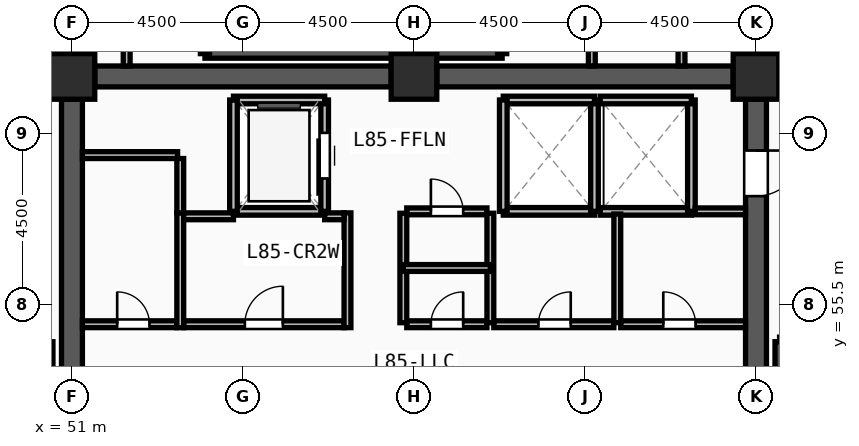
"""IFC4 building model, lengths in metres.
Left out: names, types, materials, properties, quantities, classifications, styles, units other than length and angle.
Written with IfcOpenShell. Run it as: python <this file> out.ifc"""

import sys

from ifc_helpers import new_model, si_unit, direction, frame, frame_2d, origin, origin_2d, place, context, subcontext, project, spatial, rectangle, extrude, source, transform, mapped, element, fill, save


model = new_model("IFC4")
c1 = context("Model", 3, precision=1e-05, world=origin(), true_north=direction((0.0, 1.0)))
c2 = subcontext(c1, "Body", "Model", "MODEL_VIEW")
j1 = project(units=[si_unit("LENGTHUNIT", "METRE"), si_unit("PLANEANGLEUNIT", "RADIAN")], contexts=[c1])
p1 = place(None, origin())
s1 = spatial("IfcSite", under=j1, at=p1, CompositionType="ELEMENT")
p2 = place(p1, origin())
s2 = spatial("IfcBuilding", under=s1, at=p2, CompositionType="ELEMENT")
p3 = place(p2, frame((0.0, 0.0, 328.5)))
s3 = spatial("IfcBuildingStorey", under=s2, at=p3, CompositionType="ELEMENT", Elevation=328.5)
m1 = source(origin(), c2, "Body", "SweptSolid", [
    extrude(rectangle(XDim=1.2, YDim=1.2, at=origin_2d()), origin(), (0.0, 0.0, 1.0), 3.75),
])
for number, where, z_axis, x_axis in (
    (1, (69.0, 61.5, 0.0), (0.0, 0.0, 1.0), (1.0, 0.0, 0.0)),
    (2, (60.0, 61.5, 0.0), (0.0, 0.0, 1.0), (1.0, 0.0, 0.0)),
    (3, (51.0, 61.5, 0.0), (0.0, 0.0, 1.0), (1.0, 0.0, 0.0)),
):
    element("IfcColumn", number, at=place(p3, frame(where, z_axis=z_axis, x_axis=x_axis)), inside=s3, PredefinedType="COLUMN", context=c2, shape_type="MappedRepresentation", body=[
        mapped(m1, transform((0.0, 0.0, 0.0), x_axis=(1.0, 0.0, 0.0), y_axis=(0.0, 1.0, 0.0), z_axis=(0.0, 0.0, 1.0), scale=1.0)),
    ])
for number, where, z_axis, x_axis in (
    (4, (51.6, 61.5, 0.0), (0.0, 0.0, 1.0), (1.0, 0.0, 0.0)),
    (5, (60.6, 61.5, 0.0), (0.0, 0.0, 1.0), (1.0, 0.0, 0.0)),
):
    element("IfcWall", number, at=place(p3, frame(where, z_axis=z_axis, x_axis=x_axis)), inside=s3, PredefinedType="SHEAR", context=c2, shape_type="SweptSolid", body=[
        extrude(rectangle(XDim=7.8, YDim=0.55, at=frame_2d((3.9, 0.0))), origin(), (0.0, 0.0, 1.0), 3.57),
    ])
p4 = place(p3, frame((69.0, 60.9, 0.0), z_axis=(0.0, 0.0, 1.0), x_axis=(0.0, -1.0, 0.0)))
e6 = element("IfcWall", 6, at=p4, inside=s3, PredefinedType="SHEAR", context=c2, shape_type="SweptSolid", body=[
    extrude(rectangle(XDim=13.8, YDim=0.55, at=frame_2d((6.9, 0.0))), origin(), (0.0, 0.0, 1.0), 3.57),
])
m2 = source(origin(), c2, "Body", "SweptSolid", [
    extrude(rectangle(XDim=1.2, YDim=2.2, at=frame_2d((0.6, 1.1))), frame((0.0, 0.285, 0.0), z_axis=(0.0, -1.0, 0.0), x_axis=(1.0, 0.0, 0.0)), (0.0, 0.0, 1.0), 0.57),
])
p5 = place(p4, frame((1.35, 0.0, 0.0)))
e7 = element("IfcOpeningElement", 7, at=p5, cuts=e6, PredefinedType="OPENING", context=c2, shape_type="MappedRepresentation", body=[
    mapped(m2, transform((0.0, 0.0, 0.0), x_axis=(1.0, 0.0, 0.0), y_axis=(0.0, 1.0, 0.0), z_axis=(0.0, 0.0, 1.0), scale=1.0)),
])
p6 = place(p3, frame((51.0, 47.1, 0.0), z_axis=(0.0, 0.0, 1.0), x_axis=(0.0, 1.0, 0.0)))
e8 = element("IfcWall", 8, at=p6, inside=s3, PredefinedType="SHEAR", context=c2, shape_type="SweptSolid", body=[
    extrude(rectangle(XDim=13.8, YDim=0.55, at=frame_2d((6.9, 0.0))), origin(), (0.0, 0.0, 1.0), 3.57),
])
for number, where, z_axis, x_axis in (
    (9, (50.38, 46.7, 0.0), (0.0, 0.0, 1.0), (0.0, 1.0, 0.0)),
    (10, (69.62, 54.52, 0.0), (0.0, 0.0, 1.0), (0.0, -1.0, 0.0)),
    (11, (54.5, 62.1, 0.0), (0.0, 0.0, 1.0), (1.0, 0.0, 0.0)),
):
    element("IfcWall", number, at=place(p3, frame(where, z_axis=z_axis, x_axis=x_axis)), inside=s3, PredefinedType="SOLIDWALL", context=c2, shape_type="SweptSolid", body=[
        extrude(rectangle(XDim=7.82, YDim=0.24, at=frame_2d((3.91, 0.0))), origin(), (0.0, 0.0, 1.0), 3.57),
    ])
for number, where, z_axis, x_axis in (
    (12, (62.32, 62.1, 0.0), (0.0, 0.0, 1.0), (0.0, 1.0, 0.0)),
    (13, (54.5, 65.54, 0.0), (0.0, 0.0, 1.0), (0.0, -1.0, 0.0)),
):
    element("IfcWall", number, at=place(p3, frame(where, z_axis=z_axis, x_axis=x_axis)), inside=s3, PredefinedType="SOLIDWALL", context=c2, shape_type="SweptSolid", body=[
        extrude(rectangle(XDim=3.44, YDim=0.24, at=frame_2d((1.72, 0.0))), origin(), (0.0, 0.0, 1.0), 3.57),
    ])
p7 = place(p3, frame((55.25, 57.95, 0.0), z_axis=(0.0, 0.0, 1.0), x_axis=(1.0, 0.0, 0.0)))
e14 = element("IfcWall", 14, at=p7, inside=s3, PredefinedType="SOLIDWALL", context=c2, shape_type="SweptSolid", body=[
    extrude(rectangle(XDim=2.4, YDim=0.2, at=frame_2d((1.2, 0.0))), origin(), (0.0, 0.0, 1.0), 3.57),
])
p8 = place(p3, frame((57.65, 57.95, 0.0), z_axis=(0.0, 0.0, 1.0), x_axis=(0.0, 1.0, 0.0)))
e15 = element("IfcWall", 15, at=p8, inside=s3, PredefinedType="SOLIDWALL", context=c2, shape_type="SweptSolid", body=[
    extrude(rectangle(XDim=2.93, YDim=0.2, at=frame_2d((1.465, 0.0))), origin(), (0.0, 0.0, 1.0), 3.57),
])
m3 = source(origin(), c2, "Body", "SweptSolid", [
    extrude(rectangle(XDim=1.2, YDim=2.3, at=frame_2d((0.6, 1.15))), frame((0.0, 0.11, 0.0), z_axis=(0.0, -1.0, 0.0), x_axis=(1.0, 0.0, 0.0)), (0.0, 0.0, 1.0), 0.22),
])
p9 = place(p8, frame((0.865, 0.0, 0.0)))
e16 = element("IfcOpeningElement", 16, at=p9, cuts=e15, PredefinedType="OPENING", context=c2, shape_type="MappedRepresentation", body=[
    mapped(m3, transform((0.0, 0.0, 0.0), x_axis=(1.0, 0.0, 0.0), y_axis=(0.0, 1.0, 0.0), z_axis=(0.0, 0.0, 1.0), scale=1.0)),
])
p10 = place(p3, frame((57.65, 60.88, 0.0), z_axis=(0.0, 0.0, 1.0), x_axis=(-1.0, 0.0, 0.0)))
e17 = element("IfcWall", 17, at=p10, inside=s3, PredefinedType="SOLIDWALL", context=c2, shape_type="SweptSolid", body=[
    extrude(rectangle(XDim=2.4, YDim=0.2, at=frame_2d((1.2, 0.0))), origin(), (0.0, 0.0, 1.0), 3.57),
])
p11 = place(p3, frame((55.25, 60.88, 0.0), z_axis=(0.0, 0.0, 1.0), x_axis=(0.0, -1.0, 0.0)))
e18 = element("IfcWall", 18, at=p11, inside=s3, PredefinedType="SOLIDWALL", context=c2, shape_type="SweptSolid", body=[
    extrude(rectangle(XDim=2.93, YDim=0.2, at=frame_2d((1.465, 0.0))), origin(), (0.0, 0.0, 1.0), 3.57),
])
p12 = place(p3, frame((62.35, 57.95, 0.0), z_axis=(0.0, 0.0, 1.0), x_axis=(1.0, 0.0, 0.0)))
e19 = element("IfcWall", 19, at=p12, inside=s3, PredefinedType="SOLIDWALL", context=c2, shape_type="SweptSolid", body=[
    extrude(rectangle(XDim=2.4, YDim=0.2, at=frame_2d((1.2, 0.0))), origin(), (0.0, 0.0, 1.0), 3.57),
])
p13 = place(p3, frame((64.75, 57.95, 0.0), z_axis=(0.0, 0.0, 1.0), x_axis=(0.0, 1.0, 0.0)))
e20 = element("IfcWall", 20, at=p13, inside=s3, PredefinedType="SOLIDWALL", context=c2, shape_type="SweptSolid", body=[
    extrude(rectangle(XDim=2.93, YDim=0.2, at=frame_2d((1.465, 0.0))), origin(), (0.0, 0.0, 1.0), 3.57),
])
p14 = place(p3, frame((64.75, 60.88, 0.0), z_axis=(0.0, 0.0, 1.0), x_axis=(-1.0, 0.0, 0.0)))
e21 = element("IfcWall", 21, at=p14, inside=s3, PredefinedType="SOLIDWALL", context=c2, shape_type="SweptSolid", body=[
    extrude(rectangle(XDim=2.4, YDim=0.2, at=frame_2d((1.2, 0.0))), origin(), (0.0, 0.0, 1.0), 3.57),
])
p15 = place(p3, frame((62.35, 60.88, 0.0), z_axis=(0.0, 0.0, 1.0), x_axis=(0.0, -1.0, 0.0)))
e22 = element("IfcWall", 22, at=p15, inside=s3, PredefinedType="SOLIDWALL", context=c2, shape_type="SweptSolid", body=[
    extrude(rectangle(XDim=2.93, YDim=0.2, at=frame_2d((1.465, 0.0))), origin(), (0.0, 0.0, 1.0), 3.57),
])
p16 = place(p3, frame((64.9, 57.95, 0.0), z_axis=(0.0, 0.0, 1.0), x_axis=(1.0, 0.0, 0.0)))
e23 = element("IfcWall", 23, at=p16, inside=s3, PredefinedType="SOLIDWALL", context=c2, shape_type="SweptSolid", body=[
    extrude(rectangle(XDim=2.4, YDim=0.2, at=frame_2d((1.2, 0.0))), origin(), (0.0, 0.0, 1.0), 3.57),
])
p17 = place(p3, frame((67.3, 57.95, 0.0), z_axis=(0.0, 0.0, 1.0), x_axis=(0.0, 1.0, 0.0)))
e24 = element("IfcWall", 24, at=p17, inside=s3, PredefinedType="SOLIDWALL", context=c2, shape_type="SweptSolid", body=[
    extrude(rectangle(XDim=2.93, YDim=0.2, at=frame_2d((1.465, 0.0))), origin(), (0.0, 0.0, 1.0), 3.57),
])
p18 = place(p3, frame((67.3, 60.88, 0.0), z_axis=(0.0, 0.0, 1.0), x_axis=(-1.0, 0.0, 0.0)))
e25 = element("IfcWall", 25, at=p18, inside=s3, PredefinedType="SOLIDWALL", context=c2, shape_type="SweptSolid", body=[
    extrude(rectangle(XDim=2.4, YDim=0.2, at=frame_2d((1.2, 0.0))), origin(), (0.0, 0.0, 1.0), 3.57),
])
p19 = place(p3, frame((53.94, 54.98, 0.0), z_axis=(0.0, 0.0, 1.0), x_axis=(1.0, 0.0, 0.0)))
e26 = element("IfcWall", 26, at=p19, inside=s3, PredefinedType="PARTITIONING", context=c2, shape_type="SweptSolid", body=[
    extrude(rectangle(XDim=4.22, YDim=0.18, at=frame_2d((2.11, 0.0))), origin(), (0.0, 0.0, 1.0), 3.57),
])
m4 = source(origin(), c2, "Body", "SweptSolid", [
    extrude(rectangle(XDim=1.0, YDim=2.2, at=frame_2d((0.5, 1.1))), frame((0.0, 0.1, 0.0), z_axis=(0.0, -1.0, 0.0), x_axis=(1.0, 0.0, 0.0)), (0.0, 0.0, 1.0), 0.2),
])
p20 = place(p19, frame((1.61, 0.0, 0.0)))
e27 = element("IfcOpeningElement", 27, at=p20, cuts=e26, PredefinedType="OPENING", context=c2, shape_type="MappedRepresentation", body=[
    mapped(m4, transform((0.0, 0.0, 0.0), x_axis=(1.0, 0.0, 0.0), y_axis=(0.0, 1.0, 0.0), z_axis=(0.0, 0.0, 1.0), scale=1.0)),
])
p21 = place(p3, frame((51.275, 54.98, 0.0), z_axis=(0.0, 0.0, 1.0), x_axis=(1.0, 0.0, 0.0)))
e28 = element("IfcWall", 28, at=p21, inside=s3, PredefinedType="PARTITIONING", context=c2, shape_type="SweptSolid", body=[
    extrude(rectangle(XDim=2.485, YDim=0.18, at=frame_2d((1.243, 0.0))), origin(), (0.0, 0.0, 1.0), 3.57),
])
m5 = source(origin(), c2, "Body", "SweptSolid", [
    extrude(rectangle(XDim=0.85, YDim=2.1, at=frame_2d((0.425, 1.05))), frame((0.0, 0.1, 0.0), z_axis=(0.0, -1.0, 0.0), x_axis=(1.0, 0.0, 0.0)), (0.0, 0.0, 1.0), 0.2),
])
p22 = place(p21, frame((0.915, 0.0, 0.0)))
e29 = element("IfcOpeningElement", 29, at=p22, cuts=e28, PredefinedType="OPENING", context=c2, shape_type="MappedRepresentation", body=[
    mapped(m5, transform((0.0, 0.0, 0.0), x_axis=(1.0, 0.0, 0.0), y_axis=(0.0, 1.0, 0.0), z_axis=(0.0, 0.0, 1.0), scale=1.0)),
])
p23 = place(p3, frame((62.1, 54.98, 0.0), z_axis=(0.0, 0.0, 1.0), x_axis=(1.0, 0.0, 0.0)))
e30 = element("IfcWall", 30, at=p23, inside=s3, PredefinedType="PARTITIONING", context=c2, shape_type="SweptSolid", body=[
    extrude(rectangle(XDim=3.16, YDim=0.18, at=frame_2d((1.58, 0.0))), origin(), (0.0, 0.0, 1.0), 3.57),
])
p24 = place(p23, frame((1.175, 0.0, 0.0)))
e31 = element("IfcOpeningElement", 31, at=p24, cuts=e30, PredefinedType="OPENING", context=c2, shape_type="MappedRepresentation", body=[
    mapped(m5, transform((0.0, 0.0, 0.0), x_axis=(1.0, 0.0, 0.0), y_axis=(0.0, 1.0, 0.0), z_axis=(0.0, 0.0, 1.0), scale=1.0)),
])
p25 = place(p3, frame((65.44, 54.98, 0.0), z_axis=(0.0, 0.0, 1.0), x_axis=(1.0, 0.0, 0.0)))
e32 = element("IfcWall", 32, at=p25, inside=s3, PredefinedType="PARTITIONING", context=c2, shape_type="SweptSolid", body=[
    extrude(rectangle(XDim=3.285, YDim=0.18, at=frame_2d((1.643, 0.0))), origin(), (0.0, 0.0, 1.0), 3.57),
])
p26 = place(p25, frame((1.12, 0.0, 0.0)))
e33 = element("IfcOpeningElement", 33, at=p26, cuts=e32, PredefinedType="OPENING", context=c2, shape_type="MappedRepresentation", body=[
    mapped(m5, transform((0.0, 0.0, 0.0), x_axis=(1.0, 0.0, 0.0), y_axis=(0.0, 1.0, 0.0), z_axis=(0.0, 0.0, 1.0), scale=1.0)),
])
p27 = place(p3, frame((59.81, 54.98, 0.0), z_axis=(0.0, 0.0, 1.0), x_axis=(1.0, 0.0, 0.0)))
e34 = element("IfcWall", 34, at=p27, inside=s3, PredefinedType="PARTITIONING", context=c2, shape_type="SweptSolid", body=[
    extrude(rectangle(XDim=2.11, YDim=0.18, at=frame_2d((1.055, 0.0))), origin(), (0.0, 0.0, 1.0), 3.57),
])
p28 = place(p27, frame((0.635, 0.0, 0.0)))
e35 = element("IfcOpeningElement", 35, at=p28, cuts=e34, PredefinedType="OPENING", context=c2, shape_type="MappedRepresentation", body=[
    mapped(m5, transform((0.0, 0.0, 0.0), x_axis=(1.0, 0.0, 0.0), y_axis=(0.0, 1.0, 0.0), z_axis=(0.0, 0.0, 1.0), scale=1.0)),
])
p29 = place(p3, frame((59.81, 57.95, 0.0), z_axis=(0.0, 0.0, 1.0), x_axis=(1.0, 0.0, 0.0)))
e36 = element("IfcWall", 36, at=p29, inside=s3, PredefinedType="PARTITIONING", context=c2, shape_type="SweptSolid", body=[
    extrude(rectangle(XDim=2.11, YDim=0.18, at=frame_2d((1.055, 0.0))), origin(), (0.0, 0.0, 1.0), 3.57),
])
p30 = place(p29, frame((0.635, 0.0, 0.0)))
e37 = element("IfcOpeningElement", 37, at=p30, cuts=e36, PredefinedType="OPENING", context=c2, shape_type="MappedRepresentation", body=[
    mapped(m5, transform((0.0, 0.0, 0.0), x_axis=(1.0, 0.0, 0.0), y_axis=(0.0, 1.0, 0.0), z_axis=(0.0, 0.0, 1.0), scale=1.0)),
])
p31 = place(p3, frame((51.275, 59.43, 0.0), z_axis=(0.0, 0.0, 1.0), x_axis=(1.0, 0.0, 0.0)))
e38 = element("IfcWall", 38, at=p31, inside=s3, PredefinedType="PARTITIONING", context=c2, shape_type="SweptSolid", body=[
    extrude(rectangle(XDim=2.505, YDim=0.18, at=frame_2d((1.252, 0.0))), origin(), (0.0, 0.0, 1.0), 3.57),
])
p32 = place(p3, frame((65.35, 55.02, 0.0), z_axis=(0.0, 0.0, 1.0), x_axis=(0.0, 1.0, 0.0)))
e39 = element("IfcWall", 39, at=p32, inside=s3, PredefinedType="PARTITIONING", context=c2, shape_type="SweptSolid", body=[
    extrude(rectangle(XDim=2.86, YDim=0.18, at=frame_2d((1.43, 0.0))), origin(), (0.0, 0.0, 1.0), 3.57),
])
for number, where, z_axis, x_axis in (
    (40, (59.72, 55.02, 0.0), (0.0, 0.0, 1.0), (0.0, 1.0, 0.0)),
    (41, (62.01, 55.02, 0.0), (0.0, 0.0, 1.0), (0.0, 1.0, 0.0)),
):
    element("IfcWall", number, at=place(p3, frame(where, z_axis=z_axis, x_axis=x_axis)), inside=s3, PredefinedType="PARTITIONING", context=c2, shape_type="SweptSolid", body=[
        extrude(rectangle(XDim=2.88, YDim=0.18, at=frame_2d((1.44, 0.0))), origin(), (0.0, 0.0, 1.0), 3.57),
    ])
p33 = place(p3, frame((59.72, 56.46, 0.0), z_axis=(0.0, 0.0, 1.0), x_axis=(1.0, 0.0, 0.0)))
e42 = element("IfcWall", 42, at=p33, inside=s3, PredefinedType="PARTITIONING", context=c2, shape_type="SweptSolid", body=[
    extrude(rectangle(XDim=2.29, YDim=0.18, at=frame_2d((1.145, 0.0))), origin(), (0.0, 0.0, 1.0), 3.57),
])
p34 = place(p3, frame((50.54, 61.95, 0.0), z_axis=(0.0, 0.0, 1.0), x_axis=(0.0, 1.0, 0.0)))
e43 = element("IfcWall", 43, at=p34, inside=s3, PredefinedType="PARTITIONING", context=c2, shape_type="SweptSolid", body=[
    extrude(rectangle(XDim=3.63, YDim=0.18, at=frame_2d((1.815, 0.0))), origin(), (0.0, 0.0, 1.0), 3.57),
])
for number, where, z_axis, x_axis in (
    (44, (52.44, 61.775, 0.0), (0.0, 0.0, 1.0), (0.0, 1.0, 0.0)),
    (45, (64.68, 61.775, 0.0), (0.0, 0.0, 1.0), (0.0, 1.0, 0.0)),
    (46, (67.04, 61.775, 0.0), (0.0, 0.0, 1.0), (0.0, 1.0, 0.0)),
):
    element("IfcWall", number, at=place(p3, frame(where, z_axis=z_axis, x_axis=x_axis)), inside=s3, PredefinedType="PARTITIONING", context=c2, shape_type="SweptSolid", body=[
        extrude(rectangle(XDim=3.805, YDim=0.18, at=frame_2d((1.903, 0.0))), origin(), (0.0, 0.0, 1.0), 3.57),
    ])
p35 = place(p3, frame((69.46, 61.95, 0.0), z_axis=(0.0, 0.0, 1.0), x_axis=(0.0, 1.0, 0.0)))
e47 = element("IfcWall", 47, at=p35, inside=s3, PredefinedType="PARTITIONING", context=c2, shape_type="SweptSolid", body=[
    extrude(rectangle(XDim=3.63, YDim=0.18, at=frame_2d((1.815, 0.0))), origin(), (0.0, 0.0, 1.0), 3.57),
])
for number, where, z_axis, x_axis in (
    (48, (53.85, 54.89, 0.0), (0.0, 0.0, 1.0), (0.0, 1.0, 0.0)),
    (49, (58.25, 54.89, 0.0), (0.0, 0.0, 1.0), (0.0, 1.0, 0.0)),
):
    element("IfcWall", number, at=place(p3, frame(where, z_axis=z_axis, x_axis=x_axis)), inside=s3, PredefinedType="PARTITIONING", context=c2, shape_type="SweptSolid", body=[
        extrude(rectangle(XDim=3.02, YDim=0.18, at=frame_2d((1.51, 0.0))), origin(), (0.0, 0.0, 1.0), 3.57),
    ])
p36 = place(p3, frame((53.94, 57.82, 0.0), z_axis=(0.0, 0.0, 1.0), x_axis=(1.0, 0.0, 0.0)))
e50 = element("IfcWall", 50, at=p36, inside=s3, PredefinedType="PARTITIONING", context=c2, shape_type="SweptSolid", body=[
    extrude(rectangle(XDim=1.31, YDim=0.18, at=frame_2d((0.655, 0.0))), origin(), (0.0, 0.0, 1.0), 3.57),
])
p37 = place(p3, frame((57.65, 57.82, 0.0), z_axis=(0.0, 0.0, 1.0), x_axis=(1.0, 0.0, 0.0)))
e51 = element("IfcWall", 51, at=p37, inside=s3, PredefinedType="PARTITIONING", context=c2, shape_type="SweptSolid", body=[
    extrude(rectangle(XDim=0.51, YDim=0.18, at=frame_2d((0.255, 0.0))), origin(), (0.0, 0.0, 1.0), 3.57),
])
p38 = place(p3, frame((53.85, 57.91, 0.0), z_axis=(0.0, 0.0, 1.0), x_axis=(0.0, 1.0, 0.0)))
e52 = element("IfcWall", 52, at=p38, inside=s3, PredefinedType="PARTITIONING", context=c2, shape_type="SweptSolid", body=[
    extrude(rectangle(XDim=1.43, YDim=0.18, at=frame_2d((0.715, 0.0))), origin(), (0.0, 0.0, 1.0), 3.57),
])
p39 = place(p3, frame((67.4, 57.95, 0.0), z_axis=(0.0, 0.0, 1.0), x_axis=(1.0, 0.0, 0.0)))
e53 = element("IfcWall", 53, at=p39, inside=s3, PredefinedType="PARTITIONING", context=c2, shape_type="SweptSolid", body=[
    extrude(rectangle(XDim=1.325, YDim=0.18, at=frame_2d((0.663, 0.0))), origin(), (0.0, 0.0, 1.0), 3.57),
])
m6 = source(origin(), c2, "Body", "SweptSolid", [
    extrude(rectangle(XDim=1.2, YDim=2.2, at=frame_2d((0.6, 1.1))), frame((0.0, 0.025, 0.0), z_axis=(0.0, -1.0, 0.0), x_axis=(1.0, 0.0, 0.0)), (0.0, 0.0, 1.0), 0.05),
])
p40 = place(p5, origin())
e54 = element("IfcDoor", 54, at=p40, inside=s3, OperationType="SINGLE_SWING_LEFT", PredefinedType="DOOR", context=c2, shape_type="MappedRepresentation", body=[
    mapped(m6, transform((0.0, 0.0, 0.0), x_axis=(1.0, 0.0, 0.0), y_axis=(0.0, 1.0, 0.0), z_axis=(0.0, 0.0, 1.0), scale=1.0)),
])
fill(e7, e54)
m7 = source(origin(), c2, "Body", "SweptSolid", [
    extrude(rectangle(XDim=1.2, YDim=2.3, at=frame_2d((0.6, 1.15))), frame((0.0, 0.025, 0.0), z_axis=(0.0, -1.0, 0.0), x_axis=(1.0, 0.0, 0.0)), (0.0, 0.0, 1.0), 0.05),
])
p41 = place(p9, origin())
e55 = element("IfcDoor", 55, at=p41, inside=s3, OperationType="SLIDING_TO_LEFT", PredefinedType="DOOR", context=c2, shape_type="MappedRepresentation", body=[
    mapped(m7, transform((0.0, 0.0, 0.0), x_axis=(1.0, 0.0, 0.0), y_axis=(0.0, 1.0, 0.0), z_axis=(0.0, 0.0, 1.0), scale=1.0)),
])
fill(e16, e55)
m8 = source(origin(), c2, "Body", "SweptSolid", [
    extrude(rectangle(XDim=1.0, YDim=2.2, at=frame_2d((0.5, 1.1))), frame((0.0, 0.025, 0.0), z_axis=(0.0, -1.0, 0.0), x_axis=(1.0, 0.0, 0.0)), (0.0, 0.0, 1.0), 0.05),
])
p42 = place(p20, origin())
e56 = element("IfcDoor", 56, at=p42, inside=s3, OperationType="SINGLE_SWING_RIGHT", PredefinedType="DOOR", context=c2, shape_type="MappedRepresentation", body=[
    mapped(m8, transform((0.0, 0.0, 0.0), x_axis=(1.0, 0.0, 0.0), y_axis=(0.0, 1.0, 0.0), z_axis=(0.0, 0.0, 1.0), scale=1.0)),
])
fill(e27, e56)
m9 = source(origin(), c2, "Body", "SweptSolid", [
    extrude(rectangle(XDim=0.85, YDim=2.1, at=frame_2d((0.425, 1.05))), frame((0.0, 0.025, 0.0), z_axis=(0.0, -1.0, 0.0), x_axis=(1.0, 0.0, 0.0)), (0.0, 0.0, 1.0), 0.05),
])
p43 = place(p22, origin())
e57 = element("IfcDoor", 57, at=p43, inside=s3, OperationType="SINGLE_SWING_LEFT", PredefinedType="DOOR", context=c2, shape_type="MappedRepresentation", body=[
    mapped(m9, transform((0.0, 0.0, 0.0), x_axis=(1.0, 0.0, 0.0), y_axis=(0.0, 1.0, 0.0), z_axis=(0.0, 0.0, 1.0), scale=1.0)),
])
fill(e29, e57)
p44 = place(p24, origin())
e58 = element("IfcDoor", 58, at=p44, inside=s3, OperationType="SINGLE_SWING_RIGHT", PredefinedType="DOOR", context=c2, shape_type="MappedRepresentation", body=[
    mapped(m9, transform((0.0, 0.0, 0.0), x_axis=(1.0, 0.0, 0.0), y_axis=(0.0, 1.0, 0.0), z_axis=(0.0, 0.0, 1.0), scale=1.0)),
])
fill(e31, e58)
p45 = place(p26, origin())
e59 = element("IfcDoor", 59, at=p45, inside=s3, OperationType="SINGLE_SWING_LEFT", PredefinedType="DOOR", context=c2, shape_type="MappedRepresentation", body=[
    mapped(m9, transform((0.0, 0.0, 0.0), x_axis=(1.0, 0.0, 0.0), y_axis=(0.0, 1.0, 0.0), z_axis=(0.0, 0.0, 1.0), scale=1.0)),
])
fill(e33, e59)
p46 = place(p28, origin())
e60 = element("IfcDoor", 60, at=p46, inside=s3, OperationType="SINGLE_SWING_RIGHT", PredefinedType="DOOR", context=c2, shape_type="MappedRepresentation", body=[
    mapped(m9, transform((0.0, 0.0, 0.0), x_axis=(1.0, 0.0, 0.0), y_axis=(0.0, 1.0, 0.0), z_axis=(0.0, 0.0, 1.0), scale=1.0)),
])
fill(e35, e60)
p47 = place(p30, origin())
e61 = element("IfcDoor", 61, at=p47, inside=s3, OperationType="SINGLE_SWING_LEFT", PredefinedType="DOOR", context=c2, shape_type="MappedRepresentation", body=[
    mapped(m9, transform((0.0, 0.0, 0.0), x_axis=(1.0, 0.0, 0.0), y_axis=(0.0, 1.0, 0.0), z_axis=(0.0, 0.0, 1.0), scale=1.0)),
])
fill(e37, e61)
save(model, sys.argv[1])
